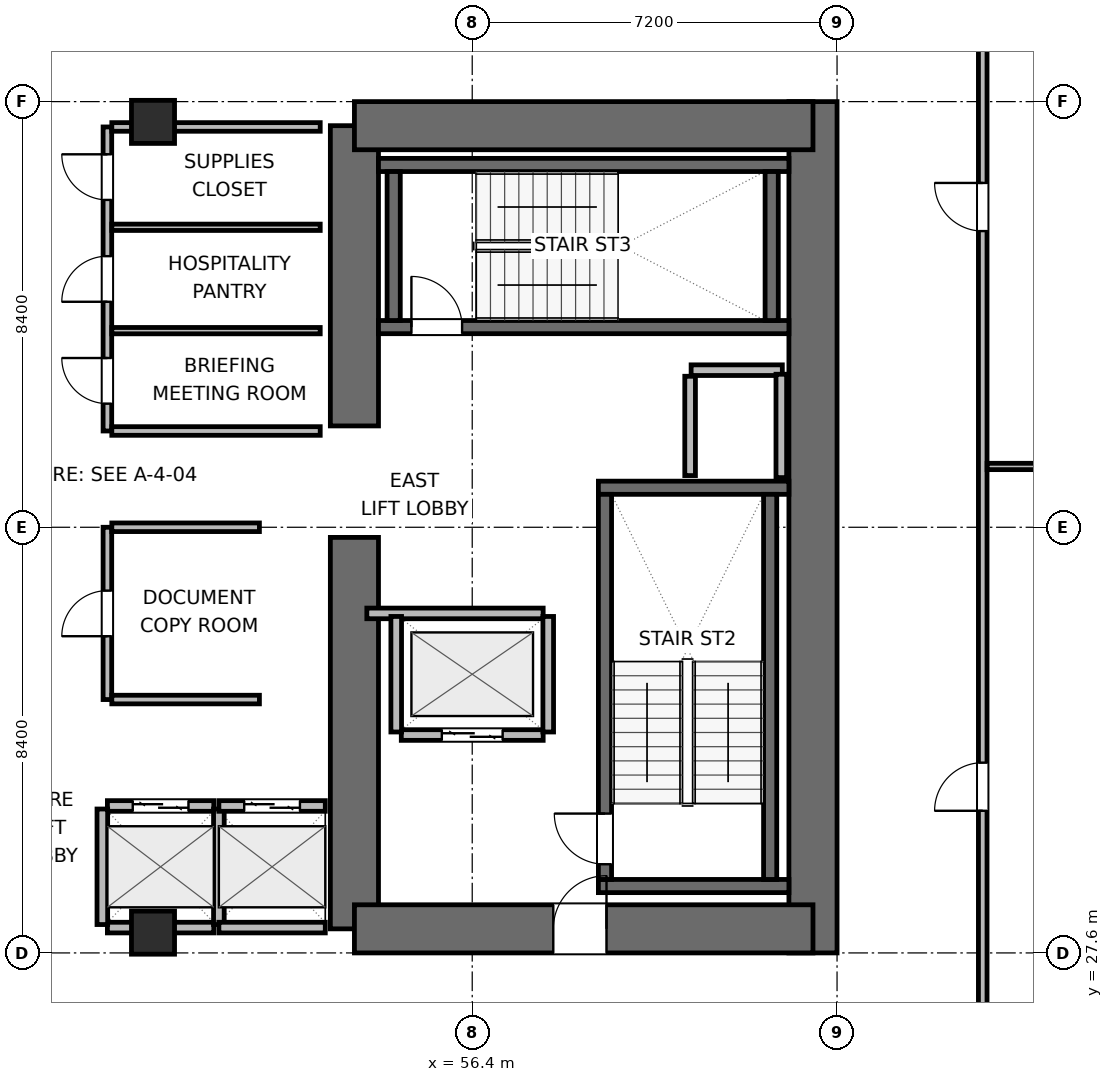
"""IFC4 building model, lengths in metres.
Left out: names, types, materials, properties, quantities, classifications, styles, units other than length and angle.
Written with IfcOpenShell. Run it as: python <this file> out.ifc"""

import sys

from ifc_helpers import new_model, si_unit, direction, frame, frame_2d, origin, origin_2d, place, context, subcontext, project, spatial, rectangle, extrude, element, fill, save


model = new_model("IFC4")
c1 = context("Model", 3, precision=1e-05, world=origin(), true_north=direction((0.0, 1.0)))
c2 = subcontext(c1, "Body", "Model", "MODEL_VIEW")
j1 = project(units=[si_unit("LENGTHUNIT", "METRE"), si_unit("PLANEANGLEUNIT", "RADIAN")], contexts=[c1])
p1 = place(None, origin())
s1 = spatial("IfcSite", under=j1, at=p1, CompositionType="ELEMENT")
p2 = place(p1, origin())
s2 = spatial("IfcBuilding", under=s1, at=p2, CompositionType="ELEMENT")
p3 = place(p2, frame((0.0, 0.0, 56.7)))
s3 = spatial("IfcBuildingStorey", under=s2, at=p3, CompositionType="ELEMENT", Elevation=56.7)
p4 = place(p3, frame((54.075, 28.075, 0.0), z_axis=(0.0, 0.0, 1.0), x_axis=(0.0, 1.0, 0.0)))
e1 = element("IfcWall", 1, at=p4, inside=s3, PredefinedType="SHEAR", context=c2, shape_type="SweptSolid", body=[
    extrude(rectangle(XDim=7.725, YDim=0.95, at=frame_2d((3.863, 0.0))), origin(), (0.0, 0.0, 1.0), 3.9),
])
p5 = place(p3, frame((54.075, 38.0, 0.0), z_axis=(0.0, 0.0, 1.0), x_axis=(0.0, 1.0, 0.0)))
e2 = element("IfcWall", 2, at=p5, inside=s3, PredefinedType="SHEAR", context=c2, shape_type="SweptSolid", body=[
    extrude(rectangle(XDim=5.925, YDim=0.95, at=frame_2d((2.962, 0.0))), origin(), (0.0, 0.0, 1.0), 3.9),
])
p6 = place(p3, frame((63.125, 27.6, 0.0), z_axis=(0.0, 0.0, 1.0), x_axis=(0.0, 1.0, 0.0)))
e3 = element("IfcWall", 3, at=p6, inside=s3, PredefinedType="SHEAR", context=c2, shape_type="SweptSolid", body=[
    extrude(rectangle(XDim=16.8, YDim=0.95, at=frame_2d((8.4, 0.0))), origin(), (0.0, 0.0, 1.0), 3.9),
])
p7 = place(p3, frame((54.075, 28.075, 0.0), z_axis=(0.0, 0.0, 1.0), x_axis=(1.0, 0.0, 0.0)))
e4 = element("IfcWall", 4, at=p7, inside=s3, PredefinedType="SHEAR", context=c2, shape_type="SweptSolid", body=[
    extrude(rectangle(XDim=9.05, YDim=0.95, at=frame_2d((4.525, 0.0))), origin(), (0.0, 0.0, 1.0), 3.9),
])
p8 = place(p7, frame((3.925, 0.0, 0.0)))
e5 = element("IfcOpeningElement", 5, at=p8, cuts=e4, PredefinedType="OPENING", context=c2, shape_type="SweptSolid", body=[
    extrude(rectangle(XDim=1.05, YDim=2.04, at=frame_2d((0.525, 1.02))), frame((0.0, 0.485, 0.0), z_axis=(0.0, -1.0, 0.0), x_axis=(1.0, 0.0, 0.0)), (0.0, 0.0, 1.0), 0.97),
])
p9 = place(p3, frame((54.075, 43.925, 0.0), z_axis=(0.0, 0.0, 1.0), x_axis=(1.0, 0.0, 0.0)))
e6 = element("IfcWall", 6, at=p9, inside=s3, PredefinedType="SHEAR", context=c2, shape_type="SweptSolid", body=[
    extrude(rectangle(XDim=9.05, YDim=0.95, at=frame_2d((4.525, 0.0))), origin(), (0.0, 0.0, 1.0), 3.9),
])
for number, where, z_axis, x_axis in (
    (7, (58.89, 28.92, 0.0), (0.0, 0.0, 1.0), (1.0, 0.0, 0.0)),
    (8, (58.89, 36.78, 0.0), (0.0, 0.0, 1.0), (1.0, 0.0, 0.0)),
):
    element("IfcWall", number, at=place(p3, frame(where, z_axis=z_axis, x_axis=x_axis)), inside=s3, PredefinedType="SHEAR", context=c2, shape_type="SweptSolid", body=[
        extrude(rectangle(XDim=3.76, YDim=0.26, at=frame_2d((1.88, 0.0))), origin(), (0.0, 0.0, 1.0), 3.9),
    ])
p10 = place(p3, frame((59.02, 29.05, 0.0), z_axis=(0.0, 0.0, 1.0), x_axis=(0.0, 1.0, 0.0)))
e9 = element("IfcWall", 9, at=p10, inside=s3, PredefinedType="SHEAR", context=c2, shape_type="SweptSolid", body=[
    extrude(rectangle(XDim=7.6, YDim=0.26, at=frame_2d((3.8, 0.0))), origin(), (0.0, 0.0, 1.0), 3.9),
])
p11 = place(p10, frame((0.3, 0.0, 0.0)))
e10 = element("IfcOpeningElement", 10, at=p11, cuts=e9, PredefinedType="OPENING", context=c2, shape_type="SweptSolid", body=[
    extrude(rectangle(XDim=1.0, YDim=2.04, at=frame_2d((0.5, 1.02))), frame((0.0, 0.14, 0.0), z_axis=(0.0, -1.0, 0.0), x_axis=(1.0, 0.0, 0.0)), (0.0, 0.0, 1.0), 0.28),
])
p12 = place(p3, frame((62.28, 29.05, 0.0), z_axis=(0.0, 0.0, 1.0), x_axis=(0.0, 1.0, 0.0)))
e11 = element("IfcWall", 11, at=p12, inside=s3, PredefinedType="SHEAR", context=c2, shape_type="SweptSolid", body=[
    extrude(rectangle(XDim=7.6, YDim=0.26, at=frame_2d((3.8, 0.0))), origin(), (0.0, 0.0, 1.0), 3.9),
])
p13 = place(p3, frame((54.55, 39.95, 0.0), z_axis=(0.0, 0.0, 1.0), x_axis=(1.0, 0.0, 0.0)))
e12 = element("IfcWall", 12, at=p13, inside=s3, PredefinedType="SHEAR", context=c2, shape_type="SweptSolid", body=[
    extrude(rectangle(XDim=8.1, YDim=0.26, at=frame_2d((4.05, 0.0))), origin(), (0.0, 0.0, 1.0), 3.9),
])
p14 = place(p13, frame((0.65, 0.0, 0.0)))
e13 = element("IfcOpeningElement", 13, at=p14, cuts=e12, PredefinedType="OPENING", context=c2, shape_type="SweptSolid", body=[
    extrude(rectangle(XDim=1.0, YDim=2.04, at=frame_2d((0.5, 1.02))), frame((0.0, 0.14, 0.0), z_axis=(0.0, -1.0, 0.0), x_axis=(1.0, 0.0, 0.0)), (0.0, 0.0, 1.0), 0.28),
])
p15 = place(p3, frame((54.55, 43.15, 0.0), z_axis=(0.0, 0.0, 1.0), x_axis=(1.0, 0.0, 0.0)))
e14 = element("IfcWall", 14, at=p15, inside=s3, PredefinedType="SHEAR", context=c2, shape_type="SweptSolid", body=[
    extrude(rectangle(XDim=8.1, YDim=0.26, at=frame_2d((4.05, 0.0))), origin(), (0.0, 0.0, 1.0), 3.9),
])
for number, where, z_axis, x_axis in (
    (15, (54.85, 40.08, 0.0), (0.0, 0.0, 1.0), (0.0, 1.0, 0.0)),
    (16, (62.31, 40.08, 0.0), (0.0, 0.0, 1.0), (0.0, 1.0, 0.0)),
):
    element("IfcWall", number, at=place(p3, frame(where, z_axis=z_axis, x_axis=x_axis)), inside=s3, PredefinedType="SHEAR", context=c2, shape_type="SweptSolid", body=[
        extrude(rectangle(XDim=2.94, YDim=0.26, at=frame_2d((1.47, 0.0))), origin(), (0.0, 0.0, 1.0), 3.9),
    ])
for number, where, z_axis, x_axis in (
    (17, (50.1, 28.0, 0.0), (0.0, 0.0, 1.0), (1.0, 0.0, 0.0)),
    (18, (50.1, 44.0, 0.0), (0.0, 0.0, 1.0), (1.0, 0.0, 0.0)),
):
    element("IfcColumn", number, at=place(p3, frame(where, z_axis=z_axis, x_axis=x_axis)), inside=s3, PredefinedType="COLUMN", context=c2, shape_type="SweptSolid", body=[
        extrude(rectangle(XDim=0.85, YDim=0.85, at=origin_2d()), origin(), (0.0, 0.0, 1.0), 3.9),
    ])
p16 = place(p3, frame((60.72, 39.1, 0.0), z_axis=(0.0, 0.0, 1.0), x_axis=(1.0, 0.0, 0.0)))
e19 = element("IfcWall", 19, at=p16, inside=s3, PredefinedType="PARTITIONING", context=c2, shape_type="SweptSolid", body=[
    extrude(rectangle(XDim=1.8, YDim=0.21, at=frame_2d((0.9, 0.0))), origin(), (0.0, 0.0, 1.0), 3.64),
])
p17 = place(p3, frame((60.7, 37.02, 0.0), z_axis=(0.0, 0.0, 1.0), x_axis=(0.0, 1.0, 0.0)))
e20 = element("IfcWall", 20, at=p17, inside=s3, PredefinedType="PARTITIONING", context=c2, shape_type="SweptSolid", body=[
    extrude(rectangle(XDim=1.96, YDim=0.21, at=frame_2d((0.98, 0.0))), origin(), (0.0, 0.0, 1.0), 3.64),
])
p18 = place(p3, frame((62.5, 36.98, 0.0), z_axis=(0.0, 0.0, 1.0), x_axis=(0.0, 1.0, 0.0)))
e21 = element("IfcWall", 21, at=p18, inside=s3, PredefinedType="PARTITIONING", context=c2, shape_type="SweptSolid", body=[
    extrude(rectangle(XDim=2.04, YDim=0.21, at=frame_2d((1.02, 0.0))), origin(), (0.0, 0.0, 1.0), 3.64),
])
p19 = place(p3, frame((55.0, 31.9, 0.0), z_axis=(0.0, 0.0, 1.0), x_axis=(1.0, 0.0, 0.0)))
e22 = element("IfcWall", 22, at=p19, inside=s3, PredefinedType="PARTITIONING", context=c2, shape_type="SweptSolid", body=[
    extrude(rectangle(XDim=2.8, YDim=0.21, at=frame_2d((1.4, 0.0))), origin(), (0.0, 0.0, 1.0), 3.64),
])
p20 = place(p19, frame((0.8, 0.0, 0.0)))
e23 = element("IfcOpeningElement", 23, at=p20, cuts=e22, PredefinedType="OPENING", context=c2, shape_type="SweptSolid", body=[
    extrude(rectangle(XDim=1.2, YDim=2.04, at=frame_2d((0.6, 1.02))), frame((0.0, 0.115, 0.0), z_axis=(0.0, -1.0, 0.0), x_axis=(1.0, 0.0, 0.0)), (0.0, 0.0, 1.0), 0.23),
])
p21 = place(p3, frame((54.32, 34.3, 0.0), z_axis=(0.0, 0.0, 1.0), x_axis=(1.0, 0.0, 0.0)))
e24 = element("IfcWall", 24, at=p21, inside=s3, PredefinedType="PARTITIONING", context=c2, shape_type="SweptSolid", body=[
    extrude(rectangle(XDim=3.48, YDim=0.21, at=frame_2d((1.74, 0.0))), origin(), (0.0, 0.0, 1.0), 3.64),
])
for number, where, z_axis, x_axis in (
    (25, (54.9, 31.96, 0.0), (0.0, 0.0, 1.0), (0.0, 1.0, 0.0)),
    (26, (57.9, 31.96, 0.0), (0.0, 0.0, 1.0), (0.0, 1.0, 0.0)),
):
    element("IfcWall", number, at=place(p3, frame(where, z_axis=z_axis, x_axis=x_axis)), inside=s3, PredefinedType="PARTITIONING", context=c2, shape_type="SweptSolid", body=[
        extrude(rectangle(XDim=2.28, YDim=0.21, at=frame_2d((1.14, 0.0))), origin(), (0.0, 0.0, 1.0), 3.64),
    ])
p22 = place(p3, frame((49.2, 30.5, 0.0), z_axis=(0.0, 0.0, 1.0), x_axis=(1.0, 0.0, 0.0)))
e27 = element("IfcWall", 27, at=p22, inside=s3, PredefinedType="PARTITIONING", context=c2, shape_type="SweptSolid", body=[
    extrude(rectangle(XDim=2.1, YDim=0.21, at=frame_2d((1.05, 0.0))), origin(), (0.0, 0.0, 1.0), 3.64),
])
p23 = place(p22, frame((0.5, 0.0, 0.0)))
e28 = element("IfcOpeningElement", 28, at=p23, cuts=e27, PredefinedType="OPENING", context=c2, shape_type="SweptSolid", body=[
    extrude(rectangle(XDim=1.1, YDim=2.04, at=frame_2d((0.55, 1.02))), frame((0.0, 0.115, 0.0), z_axis=(0.0, -1.0, 0.0), x_axis=(1.0, 0.0, 0.0)), (0.0, 0.0, 1.0), 0.23),
])
p24 = place(p3, frame((49.2, 28.1, 0.0), z_axis=(0.0, 0.0, 1.0), x_axis=(1.0, 0.0, 0.0)))
e29 = element("IfcWall", 29, at=p24, inside=s3, PredefinedType="PARTITIONING", context=c2, shape_type="SweptSolid", body=[
    extrude(rectangle(XDim=2.1, YDim=0.21, at=frame_2d((1.05, 0.0))), origin(), (0.0, 0.0, 1.0), 2.525),
])
for number, where, z_axis, x_axis in (
    (30, (49.1, 28.16, 0.0), (0.0, 0.0, 1.0), (0.0, 1.0, 0.0)),
    (31, (51.4, 28.16, 0.0), (0.0, 0.0, 1.0), (0.0, 1.0, 0.0)),
):
    element("IfcWall", number, at=place(p3, frame(where, z_axis=z_axis, x_axis=x_axis)), inside=s3, PredefinedType="PARTITIONING", context=c2, shape_type="SweptSolid", body=[
        extrude(rectangle(XDim=2.28, YDim=0.21, at=frame_2d((1.14, 0.0))), origin(), (0.0, 0.0, 1.0), 3.64),
    ])
p25 = place(p3, frame((51.4, 30.5, 0.0), z_axis=(0.0, 0.0, 1.0), x_axis=(1.0, 0.0, 0.0)))
e32 = element("IfcWall", 32, at=p25, inside=s3, PredefinedType="PARTITIONING", context=c2, shape_type="SweptSolid", body=[
    extrude(rectangle(XDim=2.1, YDim=0.21, at=frame_2d((1.05, 0.0))), origin(), (0.0, 0.0, 1.0), 3.64),
])
p26 = place(p25, frame((0.5, 0.0, 0.0)))
e33 = element("IfcOpeningElement", 33, at=p26, cuts=e32, PredefinedType="OPENING", context=c2, shape_type="SweptSolid", body=[
    extrude(rectangle(XDim=1.1, YDim=2.04, at=frame_2d((0.55, 1.02))), frame((0.0, 0.115, 0.0), z_axis=(0.0, -1.0, 0.0), x_axis=(1.0, 0.0, 0.0)), (0.0, 0.0, 1.0), 0.23),
])
p27 = place(p3, frame((51.4, 28.1, 0.0), z_axis=(0.0, 0.0, 1.0), x_axis=(1.0, 0.0, 0.0)))
e34 = element("IfcWall", 34, at=p27, inside=s3, PredefinedType="PARTITIONING", context=c2, shape_type="SweptSolid", body=[
    extrude(rectangle(XDim=2.1, YDim=0.21, at=frame_2d((1.05, 0.0))), origin(), (0.0, 0.0, 1.0), 2.525),
])
p28 = place(p3, frame((49.2, 32.6, 0.0), z_axis=(0.0, 0.0, 1.0), x_axis=(0.0, 1.0, 0.0)))
e35 = element("IfcWall", 35, at=p28, inside=s3, PredefinedType="PARTITIONING", context=c2, shape_type="SweptSolid", body=[
    extrude(rectangle(XDim=3.4, YDim=0.17, at=frame_2d((1.7, 0.0))), origin(), (0.0, 0.0, 1.0), 3.64),
])
p29 = place(p28, frame((1.25, 0.0, 0.0)))
e36 = element("IfcOpeningElement", 36, at=p29, cuts=e35, PredefinedType="OPENING", context=c2, shape_type="SweptSolid", body=[
    extrude(rectangle(XDim=0.9, YDim=2.02, at=frame_2d((0.45, 1.01))), frame((0.0, 0.095, 0.0), z_axis=(0.0, -1.0, 0.0), x_axis=(1.0, 0.0, 0.0)), (0.0, 0.0, 1.0), 0.19),
])
for number, where, z_axis, x_axis in (
    (37, (49.287, 32.6, 0.0), (0.0, 0.0, 1.0), (1.0, 0.0, 0.0)),
    (38, (49.287, 36.0, 0.0), (0.0, 0.0, 1.0), (1.0, 0.0, 0.0)),
):
    element("IfcWall", number, at=place(p3, frame(where, z_axis=z_axis, x_axis=x_axis)), inside=s3, PredefinedType="PARTITIONING", context=c2, shape_type="SweptSolid", body=[
        extrude(rectangle(XDim=2.913, YDim=0.17, at=frame_2d((1.457, 0.0))), origin(), (0.0, 0.0, 1.0), 3.64),
    ])
p30 = place(p3, frame((49.2, 37.9, 0.0), z_axis=(0.0, 0.0, 1.0), x_axis=(0.0, 1.0, 0.0)))
e39 = element("IfcWall", 39, at=p30, inside=s3, PredefinedType="PARTITIONING", context=c2, shape_type="SweptSolid", body=[
    extrude(rectangle(XDim=6.0, YDim=0.17, at=frame_2d((3.0, 0.0))), origin(), (0.0, 0.0, 1.0), 3.64),
])
p31 = place(p30, frame((0.54, 0.0, 0.0)))
e40 = element("IfcOpeningElement", 40, at=p31, cuts=e39, PredefinedType="OPENING", context=c2, shape_type="SweptSolid", body=[
    extrude(rectangle(XDim=0.9, YDim=2.02, at=frame_2d((0.45, 1.01))), frame((0.0, 0.095, 0.0), z_axis=(0.0, -1.0, 0.0), x_axis=(1.0, 0.0, 0.0)), (0.0, 0.0, 1.0), 0.19),
])
p32 = place(p30, frame((2.55, 0.0, 0.0)))
e41 = element("IfcOpeningElement", 41, at=p32, cuts=e39, PredefinedType="OPENING", context=c2, shape_type="SweptSolid", body=[
    extrude(rectangle(XDim=0.9, YDim=2.02, at=frame_2d((0.45, 1.01))), frame((0.0, 0.095, 0.0), z_axis=(0.0, -1.0, 0.0), x_axis=(1.0, 0.0, 0.0)), (0.0, 0.0, 1.0), 0.19),
])
p33 = place(p30, frame((4.56, 0.0, 0.0)))
e42 = element("IfcOpeningElement", 42, at=p33, cuts=e39, PredefinedType="OPENING", context=c2, shape_type="SweptSolid", body=[
    extrude(rectangle(XDim=0.9, YDim=2.02, at=frame_2d((0.45, 1.01))), frame((0.0, 0.095, 0.0), z_axis=(0.0, -1.0, 0.0), x_axis=(1.0, 0.0, 0.0)), (0.0, 0.0, 1.0), 0.19),
])
p34 = place(p3, frame((49.287, 37.9, 0.0), z_axis=(0.0, 0.0, 1.0), x_axis=(1.0, 0.0, 0.0)))
e43 = element("IfcWall", 43, at=p34, inside=s3, PredefinedType="PARTITIONING", context=c2, shape_type="SweptSolid", body=[
    extrude(rectangle(XDim=4.113, YDim=0.17, at=frame_2d((2.056, 0.0))), origin(), (0.0, 0.0, 1.0), 3.64),
])
p35 = place(p3, frame((49.287, 43.9, 0.0), z_axis=(0.0, 0.0, 1.0), x_axis=(1.0, 0.0, 0.0)))
e44 = element("IfcWall", 44, at=p35, inside=s3, PredefinedType="PARTITIONING", context=c2, shape_type="SweptSolid", body=[
    extrude(rectangle(XDim=4.113, YDim=0.17, at=frame_2d((2.056, 0.0))), origin(), (0.0, 0.0, 1.0), 2.525),
])
for number, where, z_axis, x_axis in (
    (45, (49.287, 39.88, 0.0), (0.0, 0.0, 1.0), (1.0, 0.0, 0.0)),
    (46, (49.287, 41.92, 0.0), (0.0, 0.0, 1.0), (1.0, 0.0, 0.0)),
):
    element("IfcWall", number, at=place(p3, frame(where, z_axis=z_axis, x_axis=x_axis)), inside=s3, PredefinedType="PARTITIONING", context=c2, shape_type="SweptSolid", body=[
        extrude(rectangle(XDim=4.113, YDim=0.125, at=frame_2d((2.056, 0.0))), origin(), (0.0, 0.0, 1.0), 3.64),
    ])
p36 = place(p3, frame((66.475, 24.647, 0.0), z_axis=(0.0, 0.0, 1.0), x_axis=(0.0, 1.0, 0.0)))
e47 = element("IfcWall", 47, at=p36, inside=s3, PredefinedType="PARTITIONING", context=c2, shape_type="SweptSolid", body=[
    extrude(rectangle(XDim=22.706, YDim=0.17, at=frame_2d((11.353, 0.0))), origin(), (0.0, 0.0, 1.0), 3.64),
])
p37 = place(p36, frame((5.758, 0.0, 0.0)))
e48 = element("IfcOpeningElement", 48, at=p37, cuts=e47, PredefinedType="OPENING", context=c2, shape_type="SweptSolid", body=[
    extrude(rectangle(XDim=0.95, YDim=2.04, at=frame_2d((0.475, 1.02))), frame((0.0, 0.095, 0.0), z_axis=(0.0, -1.0, 0.0), x_axis=(1.0, 0.0, 0.0)), (0.0, 0.0, 1.0), 0.19),
])
p38 = place(p36, frame((17.198, 0.0, 0.0)))
e49 = element("IfcOpeningElement", 49, at=p38, cuts=e47, PredefinedType="OPENING", context=c2, shape_type="SweptSolid", body=[
    extrude(rectangle(XDim=0.95, YDim=2.04, at=frame_2d((0.475, 1.02))), frame((0.0, 0.095, 0.0), z_axis=(0.0, -1.0, 0.0), x_axis=(1.0, 0.0, 0.0)), (0.0, 0.0, 1.0), 0.19),
])
p39 = place(p3, frame((66.562, 37.2, 0.0), z_axis=(0.0, 0.0, 1.0), x_axis=(1.0, 0.0, 0.0)))
e50 = element("IfcWall", 50, at=p39, inside=s3, PredefinedType="PARTITIONING", context=c2, shape_type="SweptSolid", body=[
    extrude(rectangle(XDim=12.393, YDim=0.125, at=frame_2d((6.197, 0.0))), origin(), (0.0, 0.0, 1.0), 3.64),
])
p40 = place(p11, origin())
e51 = element("IfcDoor", 51, at=p40, inside=s3, OperationType="SINGLE_SWING_RIGHT", PredefinedType="DOOR", context=c2, shape_type="SweptSolid", body=[
    extrude(rectangle(XDim=1.0, YDim=2.04, at=frame_2d((0.5, 1.02))), frame((0.0, 0.025, 0.0), z_axis=(0.0, -1.0, 0.0), x_axis=(1.0, 0.0, 0.0)), (0.0, 0.0, 1.0), 0.05),
])
fill(e10, e51)
p41 = place(p14, origin())
e52 = element("IfcDoor", 52, at=p41, inside=s3, OperationType="SINGLE_SWING_LEFT", PredefinedType="DOOR", context=c2, shape_type="SweptSolid", body=[
    extrude(rectangle(XDim=1.0, YDim=2.04, at=frame_2d((0.5, 1.02))), frame((0.0, 0.025, 0.0), z_axis=(0.0, -1.0, 0.0), x_axis=(1.0, 0.0, 0.0)), (0.0, 0.0, 1.0), 0.05),
])
fill(e13, e52)
p42 = place(p20, origin())
e53 = element("IfcDoor", 53, at=p42, inside=s3, OperationType="DOUBLE_DOOR_SLIDING", PredefinedType="DOOR", context=c2, shape_type="SweptSolid", body=[
    extrude(rectangle(XDim=1.2, YDim=2.04, at=frame_2d((0.6, 1.02))), frame((0.0, 0.025, 0.0), z_axis=(0.0, -1.0, 0.0), x_axis=(1.0, 0.0, 0.0)), (0.0, 0.0, 1.0), 0.05),
])
fill(e23, e53)
p43 = place(p23, origin())
e54 = element("IfcDoor", 54, at=p43, inside=s3, OperationType="DOUBLE_DOOR_SLIDING", PredefinedType="DOOR", context=c2, shape_type="SweptSolid", body=[
    extrude(rectangle(XDim=1.1, YDim=2.04, at=frame_2d((0.55, 1.02))), frame((0.0, 0.025, 0.0), z_axis=(0.0, -1.0, 0.0), x_axis=(1.0, 0.0, 0.0)), (0.0, 0.0, 1.0), 0.05),
])
fill(e28, e54)
p44 = place(p26, origin())
e55 = element("IfcDoor", 55, at=p44, inside=s3, OperationType="DOUBLE_DOOR_SLIDING", PredefinedType="DOOR", context=c2, shape_type="SweptSolid", body=[
    extrude(rectangle(XDim=1.1, YDim=2.04, at=frame_2d((0.55, 1.02))), frame((0.0, 0.025, 0.0), z_axis=(0.0, -1.0, 0.0), x_axis=(1.0, 0.0, 0.0)), (0.0, 0.0, 1.0), 0.05),
])
fill(e33, e55)
p45 = place(p8, origin())
e56 = element("IfcDoor", 56, at=p45, inside=s3, OperationType="SINGLE_SWING_RIGHT", PredefinedType="DOOR", context=c2, shape_type="SweptSolid", body=[
    extrude(rectangle(XDim=1.05, YDim=2.04, at=frame_2d((0.525, 1.02))), frame((0.0, 0.025, 0.0), z_axis=(0.0, -1.0, 0.0), x_axis=(1.0, 0.0, 0.0)), (0.0, 0.0, 1.0), 0.05),
])
fill(e5, e56)
p46 = place(p29, origin())
e57 = element("IfcDoor", 57, at=p46, inside=s3, OperationType="SINGLE_SWING_LEFT", PredefinedType="DOOR", context=c2, shape_type="SweptSolid", body=[
    extrude(rectangle(XDim=0.9, YDim=2.02, at=frame_2d((0.45, 1.01))), frame((0.0, 0.025, 0.0), z_axis=(0.0, -1.0, 0.0), x_axis=(1.0, 0.0, 0.0)), (0.0, 0.0, 1.0), 0.05),
])
fill(e36, e57)
p47 = place(p31, origin())
e58 = element("IfcDoor", 58, at=p47, inside=s3, OperationType="SINGLE_SWING_RIGHT", PredefinedType="DOOR", context=c2, shape_type="SweptSolid", body=[
    extrude(rectangle(XDim=0.9, YDim=2.02, at=frame_2d((0.45, 1.01))), frame((0.0, 0.025, 0.0), z_axis=(0.0, -1.0, 0.0), x_axis=(1.0, 0.0, 0.0)), (0.0, 0.0, 1.0), 0.05),
])
fill(e40, e58)
p48 = place(p32, origin())
e59 = element("IfcDoor", 59, at=p48, inside=s3, OperationType="SINGLE_SWING_LEFT", PredefinedType="DOOR", context=c2, shape_type="SweptSolid", body=[
    extrude(rectangle(XDim=0.9, YDim=2.02, at=frame_2d((0.45, 1.01))), frame((0.0, 0.025, 0.0), z_axis=(0.0, -1.0, 0.0), x_axis=(1.0, 0.0, 0.0)), (0.0, 0.0, 1.0), 0.05),
])
fill(e41, e59)
p49 = place(p33, origin())
e60 = element("IfcDoor", 60, at=p49, inside=s3, OperationType="SINGLE_SWING_RIGHT", PredefinedType="DOOR", context=c2, shape_type="SweptSolid", body=[
    extrude(rectangle(XDim=0.9, YDim=2.02, at=frame_2d((0.45, 1.01))), frame((0.0, 0.025, 0.0), z_axis=(0.0, -1.0, 0.0), x_axis=(1.0, 0.0, 0.0)), (0.0, 0.0, 1.0), 0.05),
])
fill(e42, e60)
p50 = place(p37, origin())
e61 = element("IfcDoor", 61, at=p50, inside=s3, OperationType="SINGLE_SWING_LEFT", PredefinedType="DOOR", context=c2, shape_type="SweptSolid", body=[
    extrude(rectangle(XDim=0.95, YDim=2.04, at=frame_2d((0.475, 1.02))), frame((0.0, 0.025, 0.0), z_axis=(0.0, -1.0, 0.0), x_axis=(1.0, 0.0, 0.0)), (0.0, 0.0, 1.0), 0.05),
])
fill(e48, e61)
p51 = place(p38, origin())
e62 = element("IfcDoor", 62, at=p51, inside=s3, OperationType="SINGLE_SWING_RIGHT", PredefinedType="DOOR", context=c2, shape_type="SweptSolid", body=[
    extrude(rectangle(XDim=0.95, YDim=2.04, at=frame_2d((0.475, 1.02))), frame((0.0, 0.025, 0.0), z_axis=(0.0, -1.0, 0.0), x_axis=(1.0, 0.0, 0.0)), (0.0, 0.0, 1.0), 0.05),
])
fill(e49, e62)
save(model, sys.argv[1])
